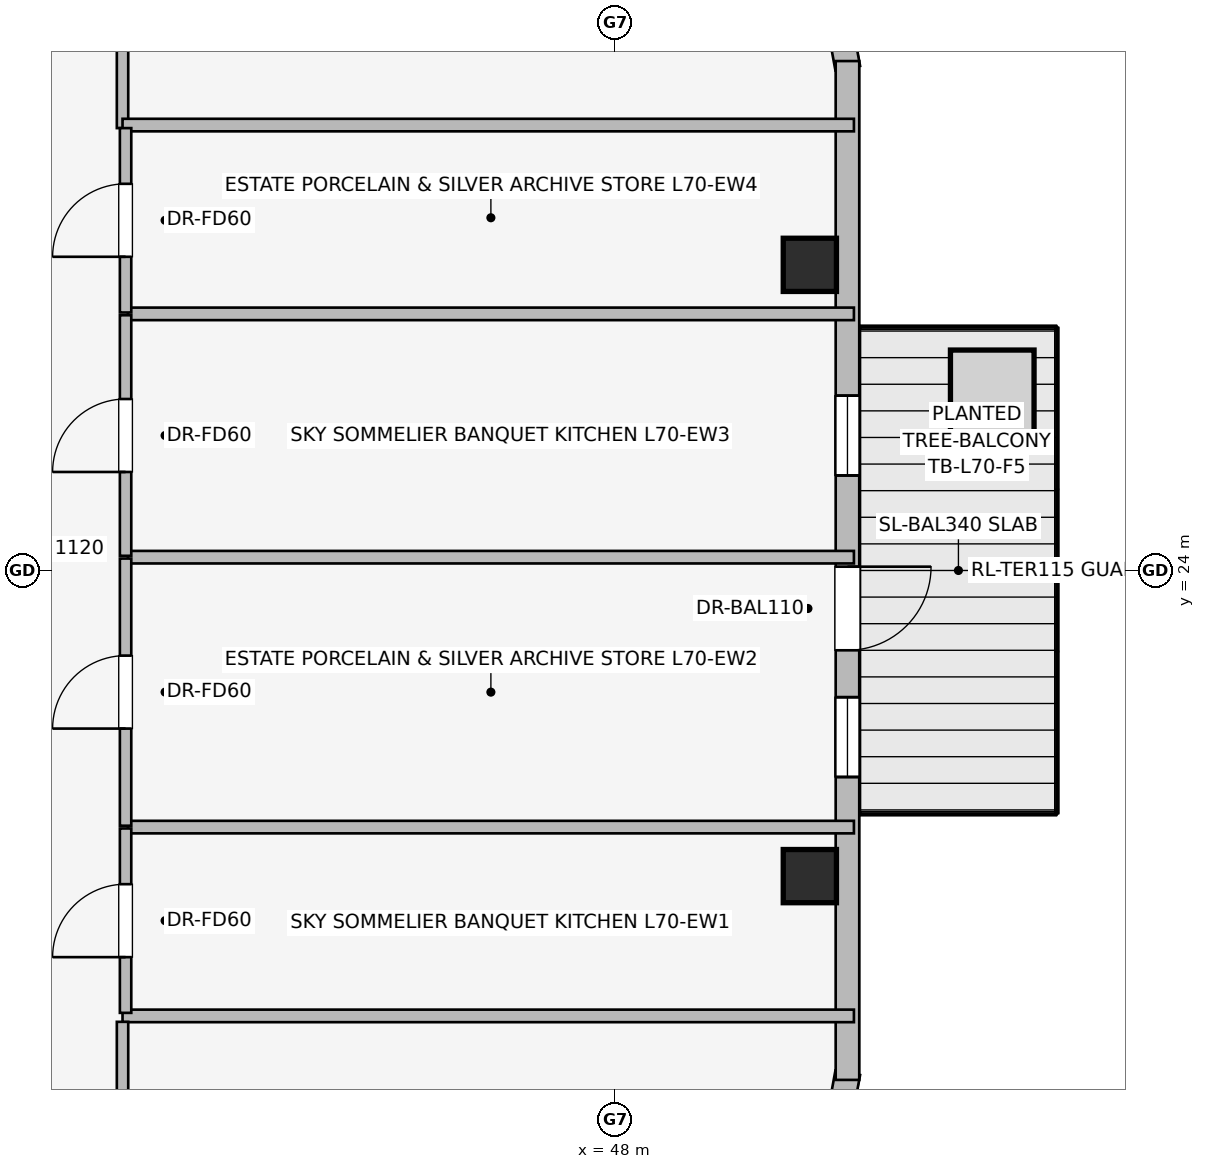
"""IFC4 building model, lengths in metres.
Left out: names, types, materials, properties, quantities, classifications, styles, units other than length and angle.
Written with IfcOpenShell. Run it as: python <this file> out.ifc"""

import sys

from ifc_helpers import new_model, si_unit, direction, frame, frame_2d, origin, origin_2d, place, context, subcontext, project, spatial, rectangle, extrude, element, fill, save


model = new_model("IFC4")
c1 = context("Model", 3, precision=1e-05, world=origin(), true_north=direction((0.0, 1.0)))
c2 = subcontext(c1, "Body", "Model", "MODEL_VIEW")
j1 = project(units=[si_unit("LENGTHUNIT", "METRE"), si_unit("PLANEANGLEUNIT", "RADIAN")], contexts=[c1])
p1 = place(None, origin())
s1 = spatial("IfcSite", under=j1, at=p1, CompositionType="ELEMENT")
p2 = place(p1, origin())
s2 = spatial("IfcBuilding", under=s1, at=p2, CompositionType="ELEMENT")
p3 = place(p2, frame((0.0, 0.0, 256.1)))
s3 = spatial("IfcBuildingStorey", under=s2, at=p3, CompositionType="ELEMENT", Elevation=256.1)
for number, where, z_axis, x_axis in (
    (1, (50.563, 19.979, 0.0), (0.0, 0.0, 1.0), (1.0, 0.0, 0.0)),
    (2, (50.563, 28.021, 0.0), (0.0, 0.0, 1.0), (1.0, 0.0, 0.0)),
):
    element("IfcColumn", number, at=place(p3, frame(where, z_axis=z_axis, x_axis=x_axis)), inside=s3, PredefinedType="COLUMN", context=c2, shape_type="SweptSolid", body=[
        extrude(rectangle(XDim=0.7, YDim=0.7, at=origin_2d()), origin(), (0.0, 0.0, 1.0), 3.55),
    ])
for number, where, z_axis, x_axis in (
    (3, (50.759, 32.257, 0.0), (0.0, 0.0, 1.0), (0.181, -0.984, 0.0)),
    (4, (51.062, 17.392, 0.0), (0.0, 0.0, 1.0), (-0.181, -0.984, 0.0)),
):
    element("IfcWall", number, at=place(p3, frame(where, z_axis=z_axis, x_axis=x_axis)), inside=s3, PredefinedType="STANDARD", context=c2, shape_type="SweptSolid", body=[
        extrude(rectangle(XDim=1.677, YDim=0.33, at=frame_2d((0.838, 0.0))), origin(), (0.0, 0.0, 1.0), 3.29),
    ])
p4 = place(p3, frame((51.058, 30.702, 0.0), z_axis=(0.0, 0.0, 1.0), x_axis=(0.0, -1.0, 0.0)))
e5 = element("IfcWall", 5, at=p4, inside=s3, PredefinedType="STANDARD", context=c2, shape_type="SweptSolid", body=[
    extrude(rectangle(XDim=13.404, YDim=0.31, at=frame_2d((6.702, 0.0))), origin(), (0.0, 0.0, 1.0), 3.29),
])
p5 = place(p4, frame((6.652, 0.0, 0.0)))
e6 = element("IfcOpeningElement", 6, at=p5, cuts=e5, PredefinedType="OPENING", context=c2, shape_type="SweptSolid", body=[
    extrude(rectangle(XDim=1.1, YDim=2.04, at=frame_2d((0.55, 1.02))), frame((0.0, 0.165, 0.0), z_axis=(0.0, -1.0, 0.0), x_axis=(1.0, 0.0, 0.0)), (0.0, 0.0, 1.0), 0.33),
])
p6 = place(p4, frame((4.402, 0.0, 0.75)))
e7 = element("IfcOpeningElement", 7, at=p6, cuts=e5, PredefinedType="OPENING", context=c2, shape_type="SweptSolid", body=[
    extrude(rectangle(XDim=1.05, YDim=1.4, at=frame_2d((0.525, 0.7))), frame((0.0, 0.165, 0.0), z_axis=(0.0, -1.0, 0.0), x_axis=(1.0, 0.0, 0.0)), (0.0, 0.0, 1.0), 0.33),
])
p7 = place(p4, frame((8.369, 0.0, 0.75)))
e8 = element("IfcOpeningElement", 8, at=p7, cuts=e5, PredefinedType="OPENING", context=c2, shape_type="SweptSolid", body=[
    extrude(rectangle(XDim=1.05, YDim=1.4, at=frame_2d((0.525, 0.7))), frame((0.0, 0.165, 0.0), z_axis=(0.0, -1.0, 0.0), x_axis=(1.0, 0.0, 0.0)), (0.0, 0.0, 1.0), 0.33),
])
p8 = place(p3, frame((41.52, 29.82, 0.0), z_axis=(0.0, 0.0, 1.0), x_axis=(0.0, 1.0, 0.0)))
e9 = element("IfcWall", 9, at=p8, inside=s3, PredefinedType="PARTITIONING", context=c2, shape_type="SweptSolid", body=[
    extrude(rectangle(XDim=1.72, YDim=0.15, at=frame_2d((0.86, 0.0))), origin(), (0.0, 0.0, 1.0), 3.29),
])
for number, where, z_axis, x_axis in (
    (10, (41.52, 18.14, 0.0), (0.0, 0.0, 1.0), (1.0, 0.0, 0.0)),
    (11, (41.52, 29.86, 0.0), (0.0, 0.0, 1.0), (1.0, 0.0, 0.0)),
):
    element("IfcWall", number, at=place(p3, frame(where, z_axis=z_axis, x_axis=x_axis)), inside=s3, PredefinedType="PARTITIONING", context=c2, shape_type="SweptSolid", body=[
        extrude(rectangle(XDim=9.623, YDim=0.165, at=frame_2d((4.812, 0.0))), origin(), (0.0, 0.0, 1.0), 3.29),
    ])
for number, where, z_axis, x_axis in (
    (12, (41.59, 20.624, 0.0), (0.0, 0.0, 1.0), (1.0, 0.0, 0.0)),
    (13, (41.59, 24.175, 0.0), (0.0, 0.0, 1.0), (1.0, 0.0, 0.0)),
    (14, (41.59, 27.376, 0.0), (0.0, 0.0, 1.0), (1.0, 0.0, 0.0)),
):
    element("IfcWall", number, at=place(p3, frame(where, z_axis=z_axis, x_axis=x_axis)), inside=s3, PredefinedType="PARTITIONING", context=c2, shape_type="SweptSolid", body=[
        extrude(rectangle(XDim=9.553, YDim=0.165, at=frame_2d((4.776, 0.0))), origin(), (0.0, 0.0, 1.0), 3.29),
    ])
p9 = place(p3, frame((41.56, 18.18, 0.0), z_axis=(0.0, 0.0, 1.0), x_axis=(0.0, 1.0, 0.0)))
e15 = element("IfcWall", 15, at=p9, inside=s3, PredefinedType="PARTITIONING", context=c2, shape_type="SweptSolid", body=[
    extrude(rectangle(XDim=2.426, YDim=0.15, at=frame_2d((1.213, 0.0))), origin(), (0.0, 0.0, 1.0), 3.29),
])
p10 = place(p9, frame((0.733, 0.0, 0.0)))
e16 = element("IfcOpeningElement", 16, at=p10, cuts=e15, PredefinedType="OPENING", context=c2, shape_type="SweptSolid", body=[
    extrude(rectangle(XDim=0.96, YDim=2.0, at=frame_2d((0.48, 1.0))), frame((0.0, 0.085, 0.0), z_axis=(0.0, -1.0, 0.0), x_axis=(1.0, 0.0, 0.0)), (0.0, 0.0, 1.0), 0.17),
])
p11 = place(p3, frame((41.56, 20.642, 0.0), z_axis=(0.0, 0.0, 1.0), x_axis=(0.0, 1.0, 0.0)))
e17 = element("IfcWall", 17, at=p11, inside=s3, PredefinedType="PARTITIONING", context=c2, shape_type="SweptSolid", body=[
    extrude(rectangle(XDim=3.515, YDim=0.15, at=frame_2d((1.757, 0.0))), origin(), (0.0, 0.0, 1.0), 3.29),
])
p12 = place(p11, frame((1.278, 0.0, 0.0)))
e18 = element("IfcOpeningElement", 18, at=p12, cuts=e17, PredefinedType="OPENING", context=c2, shape_type="SweptSolid", body=[
    extrude(rectangle(XDim=0.96, YDim=2.0, at=frame_2d((0.48, 1.0))), frame((0.0, 0.085, 0.0), z_axis=(0.0, -1.0, 0.0), x_axis=(1.0, 0.0, 0.0)), (0.0, 0.0, 1.0), 0.17),
])
p13 = place(p3, frame((41.56, 24.193, 0.0), z_axis=(0.0, 0.0, 1.0), x_axis=(0.0, 1.0, 0.0)))
e19 = element("IfcWall", 19, at=p13, inside=s3, PredefinedType="PARTITIONING", context=c2, shape_type="SweptSolid", body=[
    extrude(rectangle(XDim=3.165, YDim=0.15, at=frame_2d((1.583, 0.0))), origin(), (0.0, 0.0, 1.0), 3.29),
])
p14 = place(p13, frame((1.103, 0.0, 0.0)))
e20 = element("IfcOpeningElement", 20, at=p14, cuts=e19, PredefinedType="OPENING", context=c2, shape_type="SweptSolid", body=[
    extrude(rectangle(XDim=0.96, YDim=2.0, at=frame_2d((0.48, 1.0))), frame((0.0, 0.085, 0.0), z_axis=(0.0, -1.0, 0.0), x_axis=(1.0, 0.0, 0.0)), (0.0, 0.0, 1.0), 0.17),
])
p15 = place(p3, frame((41.56, 27.394, 0.0), z_axis=(0.0, 0.0, 1.0), x_axis=(0.0, 1.0, 0.0)))
e21 = element("IfcWall", 21, at=p15, inside=s3, PredefinedType="PARTITIONING", context=c2, shape_type="SweptSolid", body=[
    extrude(rectangle(XDim=2.426, YDim=0.15, at=frame_2d((1.213, 0.0))), origin(), (0.0, 0.0, 1.0), 3.29),
])
p16 = place(p15, frame((0.733, 0.0, 0.0)))
e22 = element("IfcOpeningElement", 22, at=p16, cuts=e21, PredefinedType="OPENING", context=c2, shape_type="SweptSolid", body=[
    extrude(rectangle(XDim=0.96, YDim=2.0, at=frame_2d((0.48, 1.0))), frame((0.0, 0.085, 0.0), z_axis=(0.0, -1.0, 0.0), x_axis=(1.0, 0.0, 0.0)), (0.0, 0.0, 1.0), 0.17),
])
p17 = place(p3, frame((41.52, 16.46, 0.0), z_axis=(0.0, 0.0, 1.0), x_axis=(0.0, 1.0, 0.0)))
e23 = element("IfcWall", 23, at=p17, inside=s3, PredefinedType="PARTITIONING", context=c2, shape_type="SweptSolid", body=[
    extrude(rectangle(XDim=1.602, YDim=0.15, at=frame_2d((0.801, 0.0))), origin(), (0.0, 0.0, 1.0), 3.29),
])
p18 = place(p5, origin())
e24 = element("IfcDoor", 24, at=p18, inside=s3, OperationType="SINGLE_SWING_LEFT", PredefinedType="DOOR", context=c2, shape_type="SweptSolid", body=[
    extrude(rectangle(XDim=1.1, YDim=2.04, at=frame_2d((0.55, 1.02))), frame((0.0, 0.025, 0.0), z_axis=(0.0, -1.0, 0.0), x_axis=(1.0, 0.0, 0.0)), (0.0, 0.0, 1.0), 0.05),
])
fill(e6, e24)
p19 = place(p6, origin())
e25 = element("IfcWindow", 25, at=p19, inside=s3, PartitioningType="SINGLE_PANEL", PredefinedType="WINDOW", context=c2, shape_type="SweptSolid", body=[
    extrude(rectangle(XDim=1.05, YDim=1.4, at=frame_2d((0.525, 0.7))), frame((0.0, 0.03, 0.0), z_axis=(0.0, -1.0, 0.0), x_axis=(1.0, 0.0, 0.0)), (0.0, 0.0, 1.0), 0.06),
])
fill(e7, e25)
p20 = place(p7, origin())
e26 = element("IfcWindow", 26, at=p20, inside=s3, PartitioningType="SINGLE_PANEL", PredefinedType="WINDOW", context=c2, shape_type="SweptSolid", body=[
    extrude(rectangle(XDim=1.05, YDim=1.4, at=frame_2d((0.525, 0.7))), frame((0.0, 0.03, 0.0), z_axis=(0.0, -1.0, 0.0), x_axis=(1.0, 0.0, 0.0)), (0.0, 0.0, 1.0), 0.06),
])
fill(e8, e26)
p21 = place(p10, origin())
e27 = element("IfcDoor", 27, at=p21, inside=s3, OperationType="SINGLE_SWING_LEFT", PredefinedType="DOOR", context=c2, shape_type="SweptSolid", body=[
    extrude(rectangle(XDim=0.96, YDim=2.0, at=frame_2d((0.48, 1.0))), frame((0.0, 0.025, 0.0), z_axis=(0.0, -1.0, 0.0), x_axis=(1.0, 0.0, 0.0)), (0.0, 0.0, 1.0), 0.05),
])
fill(e16, e27)
p22 = place(p12, origin())
e28 = element("IfcDoor", 28, at=p22, inside=s3, OperationType="SINGLE_SWING_LEFT", PredefinedType="DOOR", context=c2, shape_type="SweptSolid", body=[
    extrude(rectangle(XDim=0.96, YDim=2.0, at=frame_2d((0.48, 1.0))), frame((0.0, 0.025, 0.0), z_axis=(0.0, -1.0, 0.0), x_axis=(1.0, 0.0, 0.0)), (0.0, 0.0, 1.0), 0.05),
])
fill(e18, e28)
p23 = place(p14, origin())
e29 = element("IfcDoor", 29, at=p23, inside=s3, OperationType="SINGLE_SWING_LEFT", PredefinedType="DOOR", context=c2, shape_type="SweptSolid", body=[
    extrude(rectangle(XDim=0.96, YDim=2.0, at=frame_2d((0.48, 1.0))), frame((0.0, 0.025, 0.0), z_axis=(0.0, -1.0, 0.0), x_axis=(1.0, 0.0, 0.0)), (0.0, 0.0, 1.0), 0.05),
])
fill(e20, e29)
p24 = place(p16, origin())
e30 = element("IfcDoor", 30, at=p24, inside=s3, OperationType="SINGLE_SWING_LEFT", PredefinedType="DOOR", context=c2, shape_type="SweptSolid", body=[
    extrude(rectangle(XDim=0.96, YDim=2.0, at=frame_2d((0.48, 1.0))), frame((0.0, 0.025, 0.0), z_axis=(0.0, -1.0, 0.0), x_axis=(1.0, 0.0, 0.0)), (0.0, 0.0, 1.0), 0.05),
])
fill(e22, e30)
save(model, sys.argv[1])
